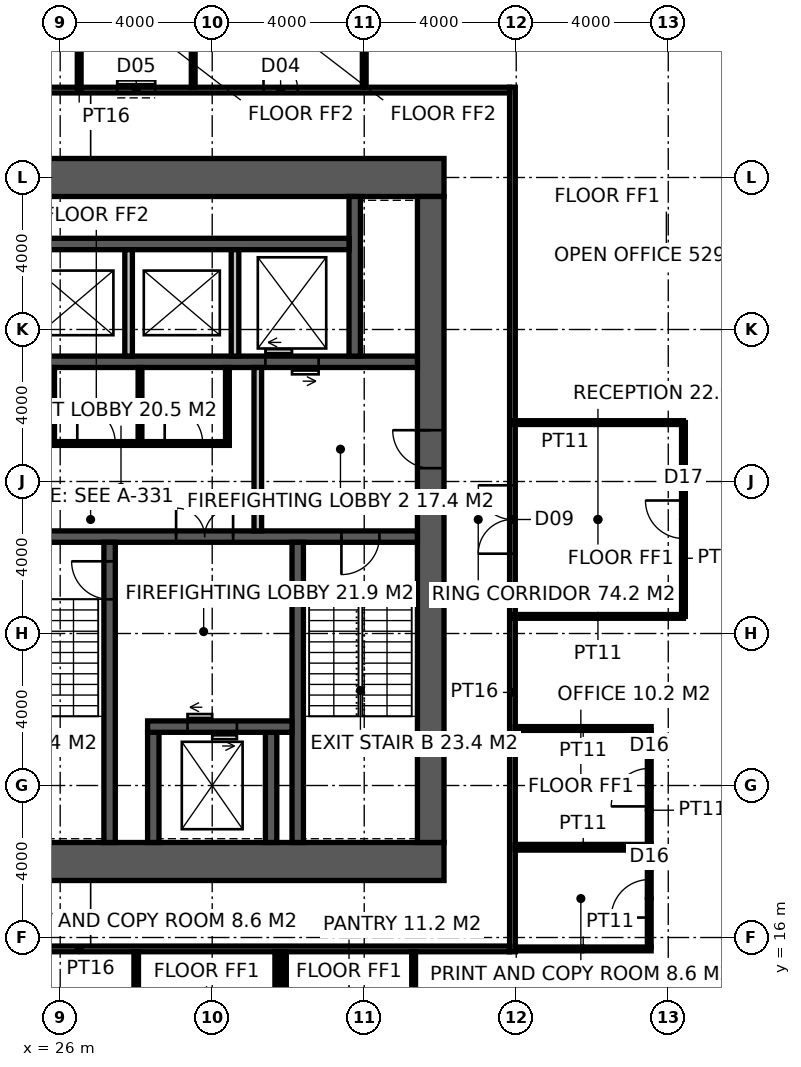
"""IFC4 building model, lengths in metres.
Left out: names, types, materials, properties, quantities, classifications, styles, units other than length and angle.
Written with IfcOpenShell. Run it as: python <this file> out.ifc"""

import sys

from ifc_helpers import new_model, si_unit, direction, frame, frame_2d, origin, place, context, subcontext, project, spatial, rectangle, extrude, element, fill, save


model = new_model("IFC4")
c1 = context("Model", 3, precision=1e-05, world=origin(), true_north=direction((0.0, 1.0)))
c2 = subcontext(c1, "Body", "Model", "MODEL_VIEW")
j1 = project(units=[si_unit("LENGTHUNIT", "METRE"), si_unit("PLANEANGLEUNIT", "RADIAN")], contexts=[c1])
p1 = place(None, origin())
s1 = spatial("IfcSite", under=j1, at=p1, CompositionType="ELEMENT")
p2 = place(p1, origin())
s2 = spatial("IfcBuilding", under=s1, at=p2, CompositionType="ELEMENT")
p3 = place(p2, frame((0.0, 0.0, 179.8)))
s3 = spatial("IfcBuildingStorey", under=s2, at=p3, CompositionType="ELEMENT", Elevation=179.8)
p4 = place(p3, frame((18.5, 18.0, -0.15), z_axis=(0.0, 0.0, 1.0), x_axis=(1.0, 0.0, 0.0)))
e1 = element("IfcWall", 1, at=p4, inside=s3, PredefinedType="SHEAR", context=c2, shape_type="SweptSolid", body=[
    extrude(rectangle(XDim=17.6, YDim=1.0, at=frame_2d((8.8, 0.0))), origin(), (0.0, 0.0, 1.0), 4.0),
])
p5 = place(p4, frame((3.45, 0.0, 0.15)))
e2 = element("IfcOpeningElement", 2, at=p5, cuts=e1, PredefinedType="OPENING", context=c2, shape_type="SweptSolid", body=[
    extrude(rectangle(XDim=1.5, YDim=2.4, at=frame_2d((0.75, 1.2))), frame((0.0, 0.51, 0.0), z_axis=(0.0, -1.0, 0.0), x_axis=(1.0, 0.0, 0.0)), (0.0, 0.0, 1.0), 1.02),
])
p6 = place(p3, frame((18.5, 36.0, -0.15), z_axis=(0.0, 0.0, 1.0), x_axis=(1.0, 0.0, 0.0)))
e3 = element("IfcWall", 3, at=p6, inside=s3, PredefinedType="SHEAR", context=c2, shape_type="SweptSolid", body=[
    extrude(rectangle(XDim=17.6, YDim=1.0, at=frame_2d((8.8, 0.0))), origin(), (0.0, 0.0, 1.0), 4.0),
])
p7 = place(p3, frame((35.75, 18.5, -0.15), z_axis=(0.0, 0.0, 1.0), x_axis=(0.0, 1.0, 0.0)))
e4 = element("IfcWall", 4, at=p7, inside=s3, PredefinedType="SHEAR", context=c2, shape_type="SweptSolid", body=[
    extrude(rectangle(XDim=17.0, YDim=0.7, at=frame_2d((8.5, 0.0))), origin(), (0.0, 0.0, 1.0), 4.0),
])
p8 = place(p7, frame((9.85, 0.0, 0.15)))
e5 = element("IfcOpeningElement", 5, at=p8, cuts=e4, PredefinedType="OPENING", context=c2, shape_type="SweptSolid", body=[
    extrude(rectangle(XDim=1.0, YDim=2.2, at=frame_2d((0.5, 1.1))), frame((0.0, 0.36, 0.0), z_axis=(0.0, -1.0, 0.0), x_axis=(1.0, 0.0, 0.0)), (0.0, 0.0, 1.0), 0.72),
])
p9 = place(p3, frame((24.15, 26.55, -0.15), z_axis=(0.0, 0.0, 1.0), x_axis=(1.0, 0.0, 0.0)))
e6 = element("IfcWall", 6, at=p9, inside=s3, PredefinedType="SHEAR", context=c2, shape_type="SweptSolid", body=[
    extrude(rectangle(XDim=11.25, YDim=0.3, at=frame_2d((5.625, 0.0))), origin(), (0.0, 0.0, 1.0), 4.0),
])
p10 = place(p9, frame((9.25, 0.0, 0.15)))
e7 = element("IfcOpeningElement", 7, at=p10, cuts=e6, PredefinedType="OPENING", context=c2, shape_type="SweptSolid", body=[
    extrude(rectangle(XDim=1.0, YDim=2.2, at=frame_2d((0.5, 1.1))), frame((0.0, 0.16, 0.0), z_axis=(0.0, -1.0, 0.0), x_axis=(1.0, 0.0, 0.0)), (0.0, 0.0, 1.0), 0.32),
])
p11 = place(p9, frame((4.9, 0.0, 0.15)))
e8 = element("IfcOpeningElement", 8, at=p11, cuts=e6, PredefinedType="OPENING", context=c2, shape_type="SweptSolid", body=[
    extrude(rectangle(XDim=1.5, YDim=2.4, at=frame_2d((0.75, 1.2))), frame((0.0, 0.16, 0.0), z_axis=(0.0, -1.0, 0.0), x_axis=(1.0, 0.0, 0.0)), (0.0, 0.0, 1.0), 0.32),
])
p12 = place(p3, frame((27.3, 18.5, -0.15), z_axis=(0.0, 0.0, 1.0), x_axis=(0.0, 1.0, 0.0)))
e9 = element("IfcWall", 9, at=p12, inside=s3, PredefinedType="SHEAR", context=c2, shape_type="SweptSolid", body=[
    extrude(rectangle(XDim=7.9, YDim=0.3, at=frame_2d((3.95, 0.0))), origin(), (0.0, 0.0, 1.0), 4.0),
])
p13 = place(p12, frame((6.4, 0.0, 0.15)))
e10 = element("IfcOpeningElement", 10, at=p13, cuts=e9, PredefinedType="OPENING", context=c2, shape_type="SweptSolid", body=[
    extrude(rectangle(XDim=1.0, YDim=2.2, at=frame_2d((0.5, 1.1))), frame((0.0, 0.16, 0.0), z_axis=(0.0, -1.0, 0.0), x_axis=(1.0, 0.0, 0.0)), (0.0, 0.0, 1.0), 0.32),
])
p14 = place(p3, frame((32.25, 18.5, -0.15), z_axis=(0.0, 0.0, 1.0), x_axis=(0.0, 1.0, 0.0)))
e11 = element("IfcWall", 11, at=p14, inside=s3, PredefinedType="SHEAR", context=c2, shape_type="SweptSolid", body=[
    extrude(rectangle(XDim=7.9, YDim=0.3, at=frame_2d((3.95, 0.0))), origin(), (0.0, 0.0, 1.0), 4.0),
])
for number, where, z_axis, x_axis in (
    (12, (28.45, 18.5, -0.15), (0.0, 0.0, 1.0), (0.0, 1.0, 0.0)),
    (13, (31.55, 18.5, -0.15), (0.0, 0.0, 1.0), (0.0, 1.0, 0.0)),
):
    element("IfcWall", number, at=place(p3, frame(where, z_axis=z_axis, x_axis=x_axis)), inside=s3, PredefinedType="SHEAR", context=c2, shape_type="SweptSolid", body=[
        extrude(rectangle(XDim=2.9, YDim=0.3, at=frame_2d((1.45, 0.0))), origin(), (0.0, 0.0, 1.0), 4.0),
    ])
p15 = place(p3, frame((28.3, 21.55, -0.15), z_axis=(0.0, 0.0, 1.0), x_axis=(1.0, 0.0, 0.0)))
e14 = element("IfcWall", 14, at=p15, inside=s3, PredefinedType="SHEAR", context=c2, shape_type="SweptSolid", body=[
    extrude(rectangle(XDim=3.8, YDim=0.3, at=frame_2d((1.9, 0.0))), origin(), (0.0, 0.0, 1.0), 4.0),
])
p16 = place(p15, frame((1.05, 0.0, 0.15)))
e15 = element("IfcOpeningElement", 15, at=p16, cuts=e14, PredefinedType="OPENING", context=c2, shape_type="SweptSolid", body=[
    extrude(rectangle(XDim=1.3, YDim=2.4, at=frame_2d((0.65, 1.2))), frame((0.0, 0.16, 0.0), z_axis=(0.0, -1.0, 0.0), x_axis=(1.0, 0.0, 0.0)), (0.0, 0.0, 1.0), 0.32),
])
p17 = place(p3, frame((24.15, 31.15, -0.15), z_axis=(0.0, 0.0, 1.0), x_axis=(1.0, 0.0, 0.0)))
e16 = element("IfcWall", 16, at=p17, inside=s3, PredefinedType="SHEAR", context=c2, shape_type="SweptSolid", body=[
    extrude(rectangle(XDim=11.25, YDim=0.3, at=frame_2d((5.625, 0.0))), origin(), (0.0, 0.0, 1.0), 4.0),
])
p18 = place(p17, frame((7.25, 0.0, 0.15)))
e17 = element("IfcOpeningElement", 17, at=p18, cuts=e16, PredefinedType="OPENING", context=c2, shape_type="SweptSolid", body=[
    extrude(rectangle(XDim=1.4, YDim=2.4, at=frame_2d((0.7, 1.2))), frame((0.0, 0.16, 0.0), z_axis=(0.0, -1.0, 0.0), x_axis=(1.0, 0.0, 0.0)), (0.0, 0.0, 1.0), 0.32),
])
p19 = place(p3, frame((33.75, 31.3, -0.15), z_axis=(0.0, 0.0, 1.0), x_axis=(0.0, 1.0, 0.0)))
e18 = element("IfcWall", 18, at=p19, inside=s3, PredefinedType="SHEAR", context=c2, shape_type="SweptSolid", body=[
    extrude(rectangle(XDim=4.2, YDim=0.3, at=frame_2d((2.1, 0.0))), origin(), (0.0, 0.0, 1.0), 4.0),
])
p20 = place(p3, frame((25.0, 34.25, -0.15), z_axis=(0.0, 0.0, 1.0), x_axis=(1.0, 0.0, 0.0)))
e19 = element("IfcWall", 19, at=p20, inside=s3, PredefinedType="SHEAR", context=c2, shape_type="SweptSolid", body=[
    extrude(rectangle(XDim=8.6, YDim=0.3, at=frame_2d((4.3, 0.0))), origin(), (0.0, 0.0, 1.0), 4.0),
])
for number, where, z_axis, x_axis in (
    (20, (27.8, 31.3, -0.15), (0.0, 0.0, 1.0), (0.0, 1.0, 0.0)),
    (21, (30.6, 31.3, -0.15), (0.0, 0.0, 1.0), (0.0, 1.0, 0.0)),
):
    element("IfcWall", number, at=place(p3, frame(where, z_axis=z_axis, x_axis=x_axis)), inside=s3, PredefinedType="SOLIDWALL", context=c2, shape_type="SweptSolid", body=[
        extrude(rectangle(XDim=2.8, YDim=0.2, at=frame_2d((1.4, 0.0))), origin(), (0.0, 0.0, 1.0), 4.0),
    ])
p21 = place(p3, frame((31.2, 26.7, 0.0), z_axis=(0.0, 0.0, 1.0), x_axis=(0.0, 1.0, 0.0)))
e22 = element("IfcWall", 22, at=p21, inside=s3, PredefinedType="SOLIDWALL", context=c2, shape_type="SweptSolid", body=[
    extrude(rectangle(XDim=4.3, YDim=0.2, at=frame_2d((2.15, 0.0))), origin(), (0.0, 0.0, 1.0), 3.85),
])
p22 = place(p3, frame((25.75, 29.0, 0.0), z_axis=(0.0, 0.0, 1.0), x_axis=(1.0, 0.0, 0.0)))
e23 = element("IfcWall", 23, at=p22, inside=s3, PredefinedType="PARTITIONING", context=c2, shape_type="SweptSolid", body=[
    extrude(rectangle(XDim=4.7, YDim=0.1, at=frame_2d((2.35, 0.0))), origin(), (0.0, 0.0, 1.0), 3.85),
])
p23 = place(p22, frame((0.7, 0.0, 0.0)))
e24 = element("IfcOpeningElement", 24, at=p23, cuts=e23, PredefinedType="OPENING", context=c2, shape_type="SweptSolid", body=[
    extrude(rectangle(XDim=1.0, YDim=2.2, at=frame_2d((0.5, 1.1))), frame((0.0, 0.06, 0.0), z_axis=(0.0, -1.0, 0.0), x_axis=(1.0, 0.0, 0.0)), (0.0, 0.0, 1.0), 0.12),
])
p24 = place(p22, frame((3.0, 0.0, 0.0)))
e25 = element("IfcOpeningElement", 25, at=p24, cuts=e23, PredefinedType="OPENING", context=c2, shape_type="SweptSolid", body=[
    extrude(rectangle(XDim=1.0, YDim=2.2, at=frame_2d((0.5, 1.1))), frame((0.0, 0.06, 0.0), z_axis=(0.0, -1.0, 0.0), x_axis=(1.0, 0.0, 0.0)), (0.0, 0.0, 1.0), 0.12),
])
for number, where, z_axis, x_axis in (
    (26, (25.8, 29.05, 0.0), (0.0, 0.0, 1.0), (0.0, 1.0, 0.0)),
    (27, (30.4, 29.05, 0.0), (0.0, 0.0, 1.0), (0.0, 1.0, 0.0)),
    (28, (28.1, 29.05, 0.0), (0.0, 0.0, 1.0), (0.0, 1.0, 0.0)),
):
    element("IfcWall", number, at=place(p3, frame(where, z_axis=z_axis, x_axis=x_axis)), inside=s3, PredefinedType="PARTITIONING", context=c2, shape_type="SweptSolid", body=[
        extrude(rectangle(XDim=1.95, YDim=0.1, at=frame_2d((0.975, 0.0))), origin(), (0.0, 0.0, 1.0), 3.85),
    ])
p25 = place(p3, frame((37.9, 15.625, 0.0), z_axis=(0.0, 0.0, 1.0), x_axis=(0.0, 1.0, 0.0)))
e29 = element("IfcWall", 29, at=p25, inside=s3, PredefinedType="PARTITIONING", context=c2, shape_type="SweptSolid", body=[
    extrude(rectangle(XDim=22.75, YDim=0.15, at=frame_2d((11.375, 0.0))), origin(), (0.0, 0.0, 1.0), 2.95),
])
p26 = place(p25, frame((10.475, 0.0, 0.0)))
e30 = element("IfcOpeningElement", 30, at=p26, cuts=e29, PredefinedType="OPENING", context=c2, shape_type="SweptSolid", body=[
    extrude(rectangle(XDim=1.8, YDim=2.4, at=frame_2d((0.9, 1.2))), frame((0.0, 0.085, 0.0), z_axis=(0.0, -1.0, 0.0), x_axis=(1.0, 0.0, 0.0)), (0.0, 0.0, 1.0), 0.17),
])
p27 = place(p3, frame((15.175, 15.7, 0.0), z_axis=(0.0, 0.0, 1.0), x_axis=(1.0, 0.0, 0.0)))
e31 = element("IfcWall", 31, at=p27, inside=s3, PredefinedType="PARTITIONING", context=c2, shape_type="SweptSolid", body=[
    extrude(rectangle(XDim=22.65, YDim=0.15, at=frame_2d((11.325, 0.0))), origin(), (0.0, 0.0, 1.0), 3.85),
])
p28 = place(p3, frame((15.175, 38.3, 0.0), z_axis=(0.0, 0.0, 1.0), x_axis=(1.0, 0.0, 0.0)))
e32 = element("IfcWall", 32, at=p28, inside=s3, PredefinedType="PARTITIONING", context=c2, shape_type="SweptSolid", body=[
    extrude(rectangle(XDim=22.65, YDim=0.15, at=frame_2d((11.325, 0.0))), origin(), (0.0, 0.0, 1.0), 3.85),
])
p29 = place(p28, frame((8.575, 0.0, 0.0)))
e33 = element("IfcOpeningElement", 33, at=p29, cuts=e32, PredefinedType="OPENING", context=c2, shape_type="SweptSolid", body=[
    extrude(rectangle(XDim=0.9, YDim=2.1, at=frame_2d((0.45, 1.05))), frame((0.0, 0.085, 0.0), z_axis=(0.0, -1.0, 0.0), x_axis=(1.0, 0.0, 0.0)), (0.0, 0.0, 1.0), 0.17),
])
p30 = place(p28, frame((12.325, 0.0, 0.0)))
e34 = element("IfcOpeningElement", 34, at=p30, cuts=e32, PredefinedType="OPENING", context=c2, shape_type="SweptSolid", body=[
    extrude(rectangle(XDim=1.0, YDim=2.1, at=frame_2d((0.5, 1.05))), frame((0.0, 0.085, 0.0), z_axis=(0.0, -1.0, 0.0), x_axis=(1.0, 0.0, 0.0)), (0.0, 0.0, 1.0), 0.17),
])
p31 = place(p28, frame((16.175, 0.0, 0.0)))
e35 = element("IfcOpeningElement", 35, at=p31, cuts=e32, PredefinedType="OPENING", context=c2, shape_type="SweptSolid", body=[
    extrude(rectangle(XDim=0.9, YDim=2.1, at=frame_2d((0.45, 1.05))), frame((0.0, 0.085, 0.0), z_axis=(0.0, -1.0, 0.0), x_axis=(1.0, 0.0, 0.0)), (0.0, 0.0, 1.0), 0.17),
])
p32 = place(p3, frame((34.0, 38.375, 0.0), z_axis=(0.0, 0.0, 1.0), x_axis=(0.0, 1.0, 0.0)))
e36 = element("IfcWall", 36, at=p32, inside=s3, PredefinedType="PARTITIONING", context=c2, shape_type="SweptSolid", body=[
    extrude(rectangle(XDim=3.675, YDim=0.1, at=frame_2d((1.837, 0.0))), origin(), (0.0, 0.0, 1.0), 2.95),
])
for number, where, z_axis, x_axis in (
    (37, (26.5, 38.375, 0.0), (0.0, 0.0, 1.0), (0.0, 1.0, 0.0)),
    (38, (29.5, 38.375, 0.0), (0.0, 0.0, 1.0), (0.0, 1.0, 0.0)),
):
    element("IfcWall", number, at=place(p3, frame(where, z_axis=z_axis, x_axis=x_axis)), inside=s3, PredefinedType="PARTITIONING", context=c2, shape_type="SweptSolid", body=[
        extrude(rectangle(XDim=3.575, YDim=0.1, at=frame_2d((1.788, 0.0))), origin(), (0.0, 0.0, 1.0), 3.85),
    ])
p33 = place(p3, frame((28.0, 8.3, 0.0), z_axis=(0.0, 0.0, 1.0), x_axis=(0.0, 1.0, 0.0)))
e39 = element("IfcWall", 39, at=p33, inside=s3, PredefinedType="PARTITIONING", context=c2, shape_type="SweptSolid", body=[
    extrude(rectangle(XDim=7.325, YDim=0.12, at=frame_2d((3.663, 0.0))), origin(), (0.0, 0.0, 1.0), 3.85),
])
for number, where, z_axis, x_axis in (
    (40, (37.975, 15.7, 0.0), (0.0, 0.0, 1.0), (1.0, 0.0, 0.0)),
    (41, (37.975, 18.35, 0.0), (0.0, 0.0, 1.0), (1.0, 0.0, 0.0)),
    (42, (37.975, 18.4, 0.0), (0.0, 0.0, 1.0), (1.0, 0.0, 0.0)),
    (43, (37.975, 21.5, 0.0), (0.0, 0.0, 1.0), (1.0, 0.0, 0.0)),
):
    element("IfcWall", number, at=place(p3, frame(where, z_axis=z_axis, x_axis=x_axis)), inside=s3, PredefinedType="PARTITIONING", context=c2, shape_type="SweptSolid", body=[
        extrude(rectangle(XDim=3.575, YDim=0.1, at=frame_2d((1.788, 0.0))), origin(), (0.0, 0.0, 1.0), 3.85),
    ])
for number, where, z_axis, x_axis in (
    (44, (31.7, 12.15, 0.0), (0.0, 0.0, 1.0), (0.0, 1.0, 0.0)),
    (45, (31.9, 12.15, 0.0), (0.0, 0.0, 1.0), (0.0, 1.0, 0.0)),
    (46, (35.3, 12.15, 0.0), (0.0, 0.0, 1.0), (0.0, 1.0, 0.0)),
):
    element("IfcWall", number, at=place(p3, frame(where, z_axis=z_axis, x_axis=x_axis)), inside=s3, PredefinedType="PARTITIONING", context=c2, shape_type="SweptSolid", body=[
        extrude(rectangle(XDim=3.475, YDim=0.1, at=frame_2d((1.738, 0.0))), origin(), (0.0, 0.0, 1.0), 3.85),
    ])
p34 = place(p3, frame((41.5, 15.75, 0.0), z_axis=(0.0, 0.0, 1.0), x_axis=(0.0, 1.0, 0.0)))
e47 = element("IfcWall", 47, at=p34, inside=s3, PredefinedType="PARTITIONING", context=c2, shape_type="SweptSolid", body=[
    extrude(rectangle(XDim=2.55, YDim=0.1, at=frame_2d((1.275, 0.0))), origin(), (0.0, 0.0, 1.0), 3.85),
])
p35 = place(p34, frame((0.775, 0.0, 0.0)))
e48 = element("IfcOpeningElement", 48, at=p35, cuts=e47, PredefinedType="OPENING", context=c2, shape_type="SweptSolid", body=[
    extrude(rectangle(XDim=1.0, YDim=2.2, at=frame_2d((0.5, 1.1))), frame((0.0, 0.06, 0.0), z_axis=(0.0, -1.0, 0.0), x_axis=(1.0, 0.0, 0.0)), (0.0, 0.0, 1.0), 0.12),
])
p36 = place(p3, frame((41.5, 18.45, 0.0), z_axis=(0.0, 0.0, 1.0), x_axis=(0.0, 1.0, 0.0)))
e49 = element("IfcWall", 49, at=p36, inside=s3, PredefinedType="PARTITIONING", context=c2, shape_type="SweptSolid", body=[
    extrude(rectangle(XDim=3.0, YDim=0.1, at=frame_2d((1.5, 0.0))), origin(), (0.0, 0.0, 1.0), 3.85),
])
p37 = place(p36, frame((1.0, 0.0, 0.0)))
e50 = element("IfcOpeningElement", 50, at=p37, cuts=e49, PredefinedType="OPENING", context=c2, shape_type="SweptSolid", body=[
    extrude(rectangle(XDim=1.0, YDim=2.2, at=frame_2d((0.5, 1.1))), frame((0.0, 0.06, 0.0), z_axis=(0.0, -1.0, 0.0), x_axis=(1.0, 0.0, 0.0)), (0.0, 0.0, 1.0), 0.12),
])
p38 = place(p3, frame((37.9, 24.45, 0.0), z_axis=(0.0, 0.0, 1.0), x_axis=(1.0, 0.0, 0.0)))
e51 = element("IfcWall", 51, at=p38, inside=s3, PredefinedType="PARTITIONING", context=c2, shape_type="SweptSolid", body=[
    extrude(rectangle(XDim=4.5, YDim=0.1, at=frame_2d((2.25, 0.0))), origin(), (0.0, 0.0, 1.0), 3.85),
])
p39 = place(p3, frame((42.4, 24.45, 0.0), z_axis=(0.0, 0.0, 1.0), x_axis=(0.0, 1.0, 0.0)))
e52 = element("IfcWall", 52, at=p39, inside=s3, PredefinedType="PARTITIONING", context=c2, shape_type="SweptSolid", body=[
    extrude(rectangle(XDim=5.1, YDim=0.1, at=frame_2d((2.55, 0.0))), origin(), (0.0, 0.0, 1.0), 3.85),
])
p40 = place(p39, frame((2.05, 0.0, 0.0)))
e53 = element("IfcOpeningElement", 53, at=p40, cuts=e52, PredefinedType="OPENING", context=c2, shape_type="SweptSolid", body=[
    extrude(rectangle(XDim=1.0, YDim=2.2, at=frame_2d((0.5, 1.1))), frame((0.0, 0.06, 0.0), z_axis=(0.0, -1.0, 0.0), x_axis=(1.0, 0.0, 0.0)), (0.0, 0.0, 1.0), 0.12),
])
p41 = place(p3, frame((42.4, 29.55, 0.0), z_axis=(0.0, 0.0, 1.0), x_axis=(-1.0, 0.0, 0.0)))
e54 = element("IfcWall", 54, at=p41, inside=s3, PredefinedType="PARTITIONING", context=c2, shape_type="SweptSolid", body=[
    extrude(rectangle(XDim=4.5, YDim=0.1, at=frame_2d((2.25, 0.0))), origin(), (0.0, 0.0, 1.0), 3.85),
])
p42 = place(p13, origin())
e55 = element("IfcDoor", 55, at=p42, inside=s3, OperationType="SINGLE_SWING_RIGHT", PredefinedType="DOOR", context=c2, shape_type="SweptSolid", body=[
    extrude(rectangle(XDim=1.0, YDim=2.2, at=frame_2d((0.5, 1.1))), frame((0.0, 0.025, 0.0), z_axis=(0.0, -1.0, 0.0), x_axis=(1.0, 0.0, 0.0)), (0.0, 0.0, 1.0), 0.05),
])
fill(e10, e55)
p43 = place(p10, frame((1.0, 0.0, 0.0), z_axis=(0.0, 0.0, 1.0), x_axis=(-1.0, 0.0, 0.0)))
e56 = element("IfcDoor", 56, at=p43, inside=s3, OperationType="SINGLE_SWING_RIGHT", PredefinedType="DOOR", context=c2, shape_type="SweptSolid", body=[
    extrude(rectangle(XDim=1.0, YDim=2.2, at=frame_2d((0.5, 1.1))), frame((0.0, 0.025, 0.0), z_axis=(0.0, -1.0, 0.0), x_axis=(1.0, 0.0, 0.0)), (0.0, 0.0, 1.0), 0.05),
])
fill(e7, e56)
p44 = place(p8, origin())
e57 = element("IfcDoor", 57, at=p44, inside=s3, OperationType="SINGLE_SWING_RIGHT", PredefinedType="DOOR", context=c2, shape_type="SweptSolid", body=[
    extrude(rectangle(XDim=1.0, YDim=2.2, at=frame_2d((0.5, 1.1))), frame((0.0, 0.025, 0.0), z_axis=(0.0, -1.0, 0.0), x_axis=(1.0, 0.0, 0.0)), (0.0, 0.0, 1.0), 0.05),
])
fill(e5, e57)
p45 = place(p11, origin())
e58 = element("IfcDoor", 58, at=p45, inside=s3, OperationType="DOUBLE_DOOR_DOUBLE_SWING", PredefinedType="DOOR", context=c2, shape_type="SweptSolid", body=[
    extrude(rectangle(XDim=1.5, YDim=2.4, at=frame_2d((0.75, 1.2))), frame((0.0, 0.025, 0.0), z_axis=(0.0, -1.0, 0.0), x_axis=(1.0, 0.0, 0.0)), (0.0, 0.0, 1.0), 0.05),
])
fill(e8, e58)
p46 = place(p23, origin())
e59 = element("IfcDoor", 59, at=p46, inside=s3, OperationType="SINGLE_SWING_LEFT", PredefinedType="DOOR", context=c2, shape_type="SweptSolid", body=[
    extrude(rectangle(XDim=1.0, YDim=2.2, at=frame_2d((0.5, 1.1))), frame((0.0, 0.025, 0.0), z_axis=(0.0, -1.0, 0.0), x_axis=(1.0, 0.0, 0.0)), (0.0, 0.0, 1.0), 0.05),
])
fill(e24, e59)
p47 = place(p24, origin())
e60 = element("IfcDoor", 60, at=p47, inside=s3, OperationType="SINGLE_SWING_LEFT", PredefinedType="DOOR", context=c2, shape_type="SweptSolid", body=[
    extrude(rectangle(XDim=1.0, YDim=2.2, at=frame_2d((0.5, 1.1))), frame((0.0, 0.025, 0.0), z_axis=(0.0, -1.0, 0.0), x_axis=(1.0, 0.0, 0.0)), (0.0, 0.0, 1.0), 0.05),
])
fill(e25, e60)
p48 = place(p30, origin())
e61 = element("IfcDoor", 61, at=p48, inside=s3, OperationType="SLIDING_TO_LEFT", PredefinedType="DOOR", context=c2, shape_type="SweptSolid", body=[
    extrude(rectangle(XDim=1.0, YDim=2.1, at=frame_2d((0.5, 1.05))), frame((0.0, 0.025, 0.0), z_axis=(0.0, -1.0, 0.0), x_axis=(1.0, 0.0, 0.0)), (0.0, 0.0, 1.0), 0.05),
])
fill(e34, e61)
p49 = place(p31, origin())
e62 = element("IfcDoor", 62, at=p49, inside=s3, OperationType="SINGLE_SWING_LEFT", PredefinedType="DOOR", context=c2, shape_type="SweptSolid", body=[
    extrude(rectangle(XDim=0.9, YDim=2.1, at=frame_2d((0.45, 1.05))), frame((0.0, 0.025, 0.0), z_axis=(0.0, -1.0, 0.0), x_axis=(1.0, 0.0, 0.0)), (0.0, 0.0, 1.0), 0.05),
])
fill(e35, e62)
p50 = place(p26, origin())
e63 = element("IfcDoor", 63, at=p50, inside=s3, OperationType="DOUBLE_DOOR_DOUBLE_SWING", PredefinedType="DOOR", context=c2, shape_type="SweptSolid", body=[
    extrude(rectangle(XDim=1.8, YDim=2.4, at=frame_2d((0.9, 1.2))), frame((0.0, 0.025, 0.0), z_axis=(0.0, -1.0, 0.0), x_axis=(1.0, 0.0, 0.0)), (0.0, 0.0, 1.0), 0.05),
])
fill(e30, e63)
p51 = place(p35, origin())
e64 = element("IfcDoor", 64, at=p51, inside=s3, OperationType="SINGLE_SWING_LEFT", PredefinedType="DOOR", context=c2, shape_type="SweptSolid", body=[
    extrude(rectangle(XDim=1.0, YDim=2.2, at=frame_2d((0.5, 1.1))), frame((0.0, 0.025, 0.0), z_axis=(0.0, -1.0, 0.0), x_axis=(1.0, 0.0, 0.0)), (0.0, 0.0, 1.0), 0.05),
])
fill(e48, e64)
p52 = place(p37, origin())
e65 = element("IfcDoor", 65, at=p52, inside=s3, OperationType="SINGLE_SWING_LEFT", PredefinedType="DOOR", context=c2, shape_type="SweptSolid", body=[
    extrude(rectangle(XDim=1.0, YDim=2.2, at=frame_2d((0.5, 1.1))), frame((0.0, 0.025, 0.0), z_axis=(0.0, -1.0, 0.0), x_axis=(1.0, 0.0, 0.0)), (0.0, 0.0, 1.0), 0.05),
])
fill(e50, e65)
p53 = place(p40, origin())
e66 = element("IfcDoor", 66, at=p53, inside=s3, OperationType="SINGLE_SWING_RIGHT", PredefinedType="DOOR", context=c2, shape_type="SweptSolid", body=[
    extrude(rectangle(XDim=1.0, YDim=2.2, at=frame_2d((0.5, 1.1))), frame((0.0, 0.025, 0.0), z_axis=(0.0, -1.0, 0.0), x_axis=(1.0, 0.0, 0.0)), (0.0, 0.0, 1.0), 0.05),
])
fill(e53, e66)
p54 = place(p16, origin())
e67 = element("IfcDoor", 67, at=p54, inside=s3, OperationType="DOUBLE_DOOR_SLIDING", PredefinedType="DOOR", context=c2, shape_type="SweptSolid", body=[
    extrude(rectangle(XDim=1.3, YDim=2.4, at=frame_2d((0.65, 1.2))), frame((0.0, 0.025, 0.0), z_axis=(0.0, -1.0, 0.0), x_axis=(1.0, 0.0, 0.0)), (0.0, 0.0, 1.0), 0.05),
])
fill(e15, e67)
p55 = place(p18, origin())
e68 = element("IfcDoor", 68, at=p55, inside=s3, OperationType="DOUBLE_DOOR_SLIDING", PredefinedType="DOOR", context=c2, shape_type="SweptSolid", body=[
    extrude(rectangle(XDim=1.4, YDim=2.4, at=frame_2d((0.7, 1.2))), frame((0.0, 0.025, 0.0), z_axis=(0.0, -1.0, 0.0), x_axis=(1.0, 0.0, 0.0)), (0.0, 0.0, 1.0), 0.05),
])
fill(e17, e68)
save(model, sys.argv[1])
